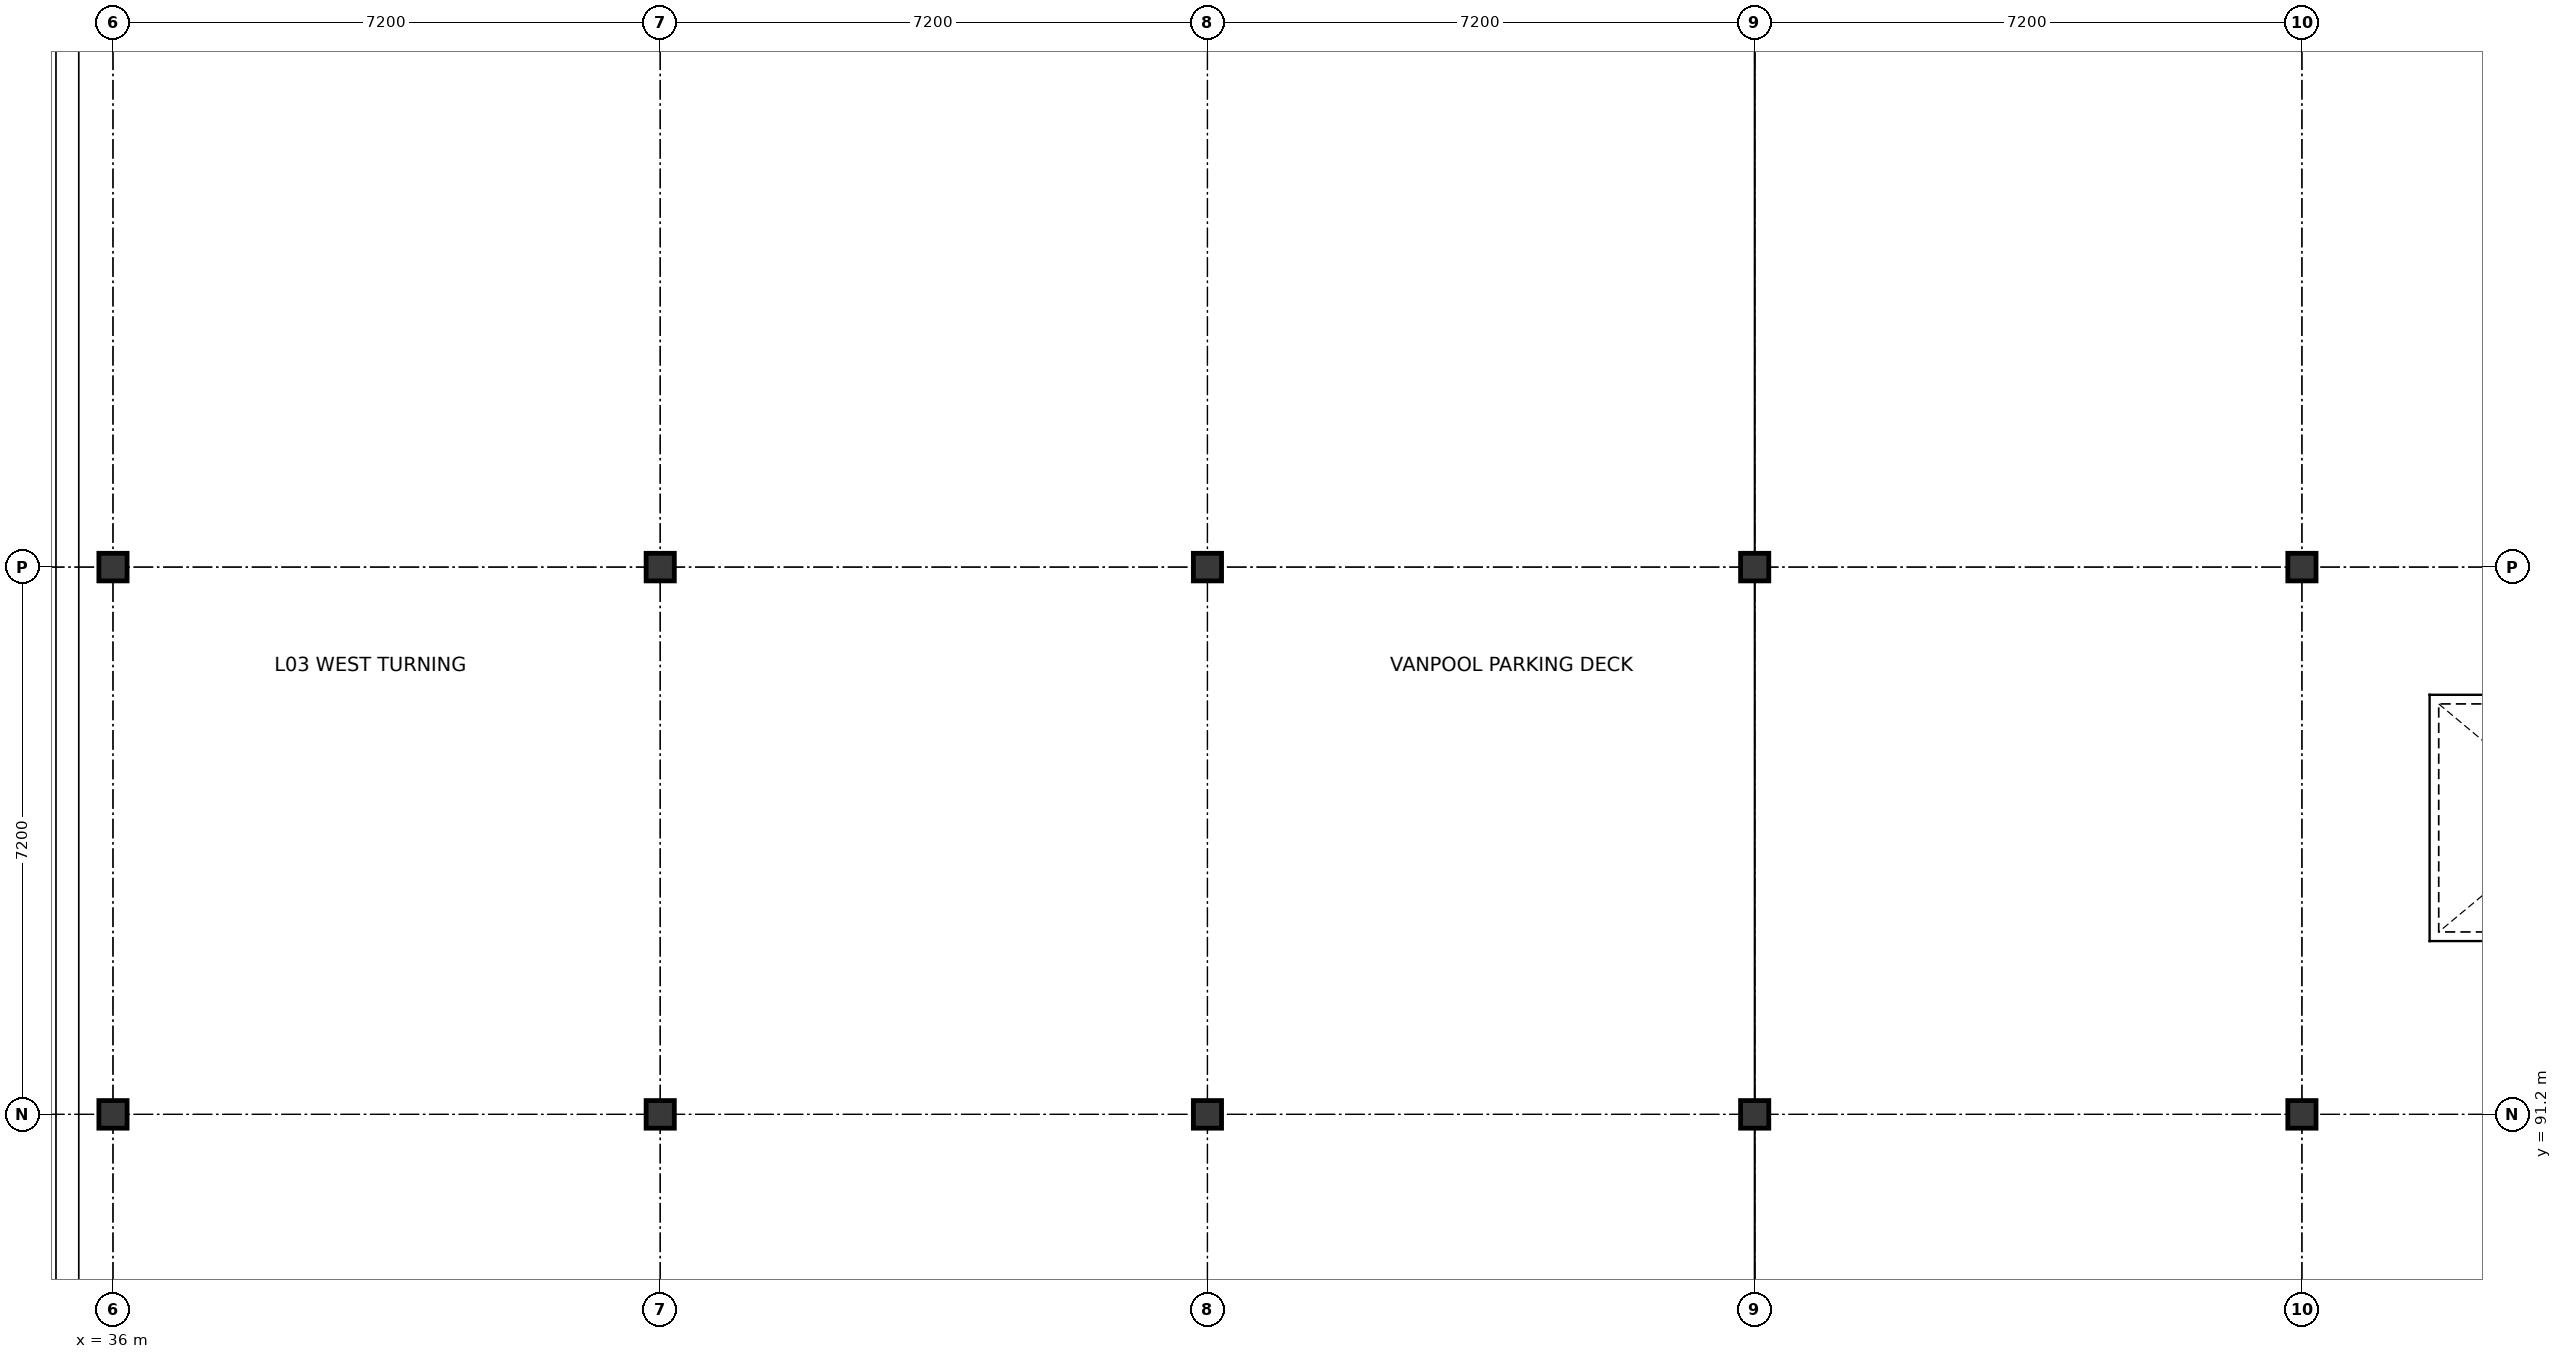
"""IFC4 building model, lengths in metres.
Left out: names, types, materials, properties, quantities, classifications, styles, units other than length and angle.
Written with IfcOpenShell. Run it as: python <this file> out.ifc"""

import sys

from ifc_helpers import new_model, si_unit, direction, frame, origin, origin_2d, place, context, subcontext, project, spatial, i_section, extrude, element, save


model = new_model("IFC4")
c1 = context("Model", 3, precision=1e-05, world=origin(), true_north=direction((0.0, 1.0)))
c2 = subcontext(c1, "Body", "Model", "MODEL_VIEW")
j1 = project(units=[si_unit("LENGTHUNIT", "METRE"), si_unit("PLANEANGLEUNIT", "RADIAN")], contexts=[c1])
p1 = place(None, origin())
s1 = spatial("IfcSite", under=j1, at=p1, CompositionType="ELEMENT")
p2 = place(p1, origin())
s2 = spatial("IfcBuilding", under=s1, at=p2, CompositionType="ELEMENT")
p3 = place(p2, frame((0.0, 0.0, 13.2)))
s3 = spatial("IfcBuildingStorey", under=s2, at=p3, CompositionType="ELEMENT", Elevation=13.2)
for number, where, z_axis, x_axis in (
    (1, (36.0, 91.2, 0.0), (0.0, 0.0, 1.0), (1.0, 0.0, 0.0)),
    (2, (36.0, 98.4, 0.0), (0.0, 0.0, 1.0), (1.0, 0.0, 0.0)),
    (3, (43.2, 91.2, 0.0), (0.0, 0.0, 1.0), (1.0, 0.0, 0.0)),
    (4, (43.2, 98.4, 0.0), (0.0, 0.0, 1.0), (1.0, 0.0, 0.0)),
    (5, (50.4, 91.2, 0.0), (0.0, 0.0, 1.0), (1.0, 0.0, 0.0)),
    (6, (50.4, 98.4, 0.0), (0.0, 0.0, 1.0), (1.0, 0.0, 0.0)),
    (7, (57.6, 91.2, 0.0), (0.0, 0.0, 1.0), (1.0, 0.0, 0.0)),
    (8, (57.6, 98.4, 0.0), (0.0, 0.0, 1.0), (1.0, 0.0, 0.0)),
    (9, (64.8, 91.2, 0.0), (0.0, 0.0, 1.0), (1.0, 0.0, 0.0)),
    (10, (64.8, 98.4, 0.0), (0.0, 0.0, 1.0), (1.0, 0.0, 0.0)),
):
    element("IfcColumn", number, at=place(p3, frame(where, z_axis=z_axis, x_axis=x_axis)), inside=s3, PredefinedType="COLUMN", context=c2, shape_type="SweptSolid", body=[
        extrude(i_section(OverallWidth=0.371, OverallDepth=0.363, WebThickness=0.013, FlangeThickness=0.022, FilletRadius=0.015, at=origin_2d()), origin(), (0.0, 0.0, 1.0), 3.9),
    ])
save(model, sys.argv[1])
